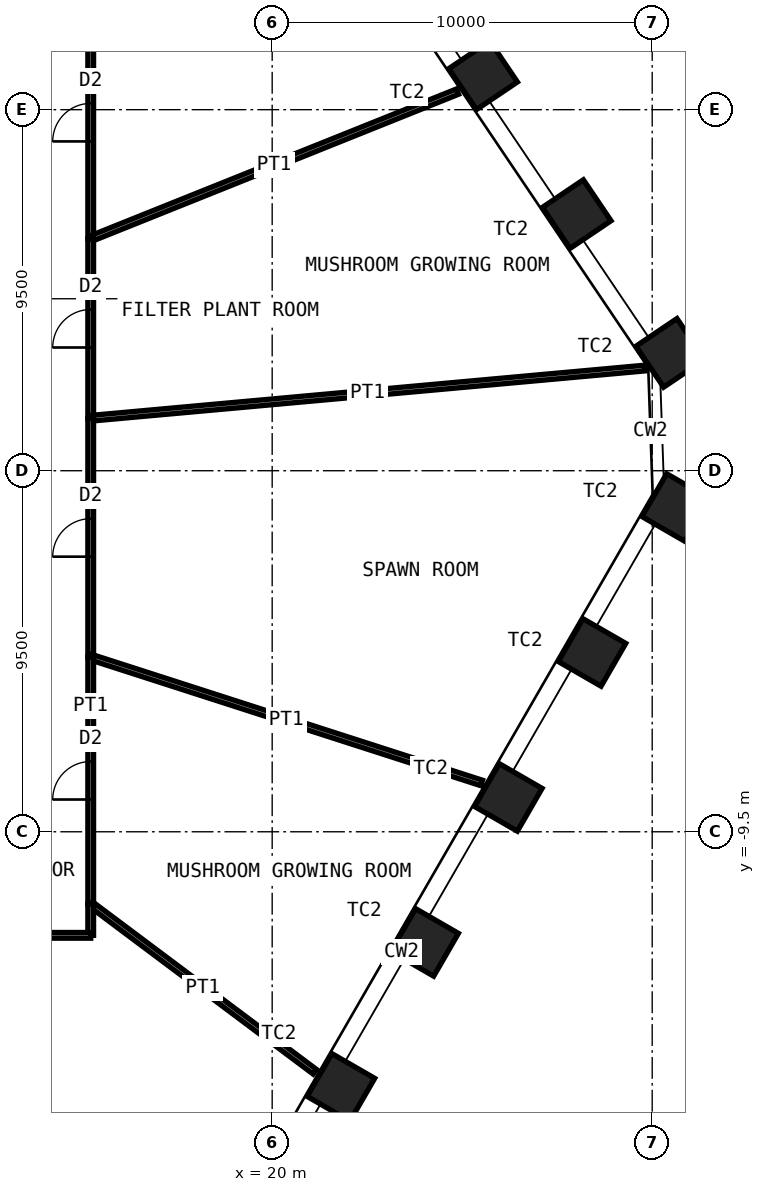
"""IFC4 building model, lengths in metres.
Left out: names, types, materials, properties, quantities, classifications, styles, units other than length and angle.
Written with IfcOpenShell. Run it as: python <this file> out.ifc"""

import sys

from ifc_helpers import new_model, si_unit, direction, frame, frame_2d, origin, origin_2d, place, context, subcontext, project, spatial, rectangle, hollow_rectangle, extrude, element, fill, save


model = new_model("IFC4")
c1 = context("Model", 3, precision=1e-05, world=origin(), true_north=direction((0.0, 1.0)))
c2 = subcontext(c1, "Body", "Model", "MODEL_VIEW")
j1 = project(units=[si_unit("LENGTHUNIT", "METRE"), si_unit("PLANEANGLEUNIT", "RADIAN")], contexts=[c1])
p1 = place(None, origin())
s1 = spatial("IfcSite", under=j1, at=p1, CompositionType="ELEMENT")
p2 = place(p1, origin())
s2 = spatial("IfcBuilding", under=s1, at=p2, CompositionType="ELEMENT")
p3 = place(p2, frame((0.0, 0.0, 67.0)))
s3 = spatial("IfcBuildingStorey", under=s2, at=p3, CompositionType="ELEMENT", Elevation=67.0)
for number, where, z_axis, x_axis in (
    (1, (25.55, 10.404, 0.0), (0.0, 0.0, 1.0), (-0.559, 0.829, 0.0)),
    (2, (28.013, 6.752, 0.0), (0.0, 0.0, 1.0), (-0.559, 0.829, 0.0)),
    (3, (30.476, 3.101, 0.0), (0.0, 0.0, 1.0), (-0.559, 0.829, 0.0)),
    (4, (30.618, -0.967, 0.0), (0.0, 0.0, 1.0), (0.5, 0.866, 0.0)),
    (5, (28.416, -4.782, 0.0), (0.0, 0.0, 1.0), (0.5, 0.866, 0.0)),
    (6, (26.214, -8.596, 0.0), (0.0, 0.0, 1.0), (0.5, 0.866, 0.0)),
    (7, (24.011, -12.411, 0.0), (0.0, 0.0, 1.0), (0.5, 0.866, 0.0)),
    (8, (21.809, -16.225, 0.0), (0.0, 0.0, 1.0), (0.5, 0.866, 0.0)),
):
    element("IfcColumn", number, at=place(p3, frame(where, z_axis=z_axis, x_axis=x_axis)), inside=s3, PredefinedType="COLUMN", context=c2, shape_type="SweptSolid", body=[
        extrude(hollow_rectangle(XDim=1.3, YDim=1.3, WallThickness=0.1, at=origin_2d()), origin(), (0.0, 0.0, 1.0), 5.0),
    ])
p4 = place(p3, frame((15.225, 12.225, 0.0), z_axis=(0.0, 0.0, 1.0), x_axis=(0.0, -1.0, 0.0)))
e9 = element("IfcWall", 9, at=p4, inside=s3, PredefinedType="PARTITIONING", context=c2, shape_type="SweptSolid", body=[
    extrude(rectangle(XDim=6.12, YDim=0.15, at=frame_2d((3.06, 0.0))), origin(), (0.0, 0.0, 1.0), 4.8),
])
p5 = place(p4, frame((2.56, 0.0, 0.0)))
e10 = element("IfcOpeningElement", 10, at=p5, cuts=e9, PredefinedType="OPENING", context=c2, shape_type="SweptSolid", body=[
    extrude(rectangle(XDim=1.0, YDim=2.4, at=frame_2d((0.5, 1.2))), frame((0.0, 0.085, 0.0), z_axis=(0.0, -1.0, 0.0), x_axis=(1.0, 0.0, 0.0)), (0.0, 0.0, 1.0), 0.17),
])
p6 = place(p3, frame((24.877, 9.975, 0.0), z_axis=(0.0, 0.0, 1.0), x_axis=(-0.928160631083, -0.372179852904, 0.0)))
e11 = element("IfcWall", 11, at=p6, inside=s3, PredefinedType="PARTITIONING", context=c2, shape_type="SweptSolid", body=[
    extrude(rectangle(XDim=10.399, YDim=0.15, at=frame_2d((5.2, 0.0))), origin(), (0.0, 0.0, 1.0), 3.7),
])
p7 = place(p3, frame((15.225, 6.105, 0.0), z_axis=(0.0, 0.0, 1.0), x_axis=(0.0, -1.0, 0.0)))
e12 = element("IfcWall", 12, at=p7, inside=s3, PredefinedType="PARTITIONING", context=c2, shape_type="SweptSolid", body=[
    extrude(rectangle(XDim=4.725, YDim=0.15, at=frame_2d((2.363, 0.0))), origin(), (0.0, 0.0, 1.0), 4.8),
])
p8 = place(p7, frame((1.863, 0.0, 0.0)))
e13 = element("IfcOpeningElement", 13, at=p8, cuts=e12, PredefinedType="OPENING", context=c2, shape_type="SweptSolid", body=[
    extrude(rectangle(XDim=1.0, YDim=2.4, at=frame_2d((0.5, 1.2))), frame((0.0, 0.085, 0.0), z_axis=(0.0, -1.0, 0.0), x_axis=(1.0, 0.0, 0.0)), (0.0, 0.0, 1.0), 0.17),
])
p9 = place(p3, frame((29.796, 2.7, 0.0), z_axis=(0.0, 0.0, 1.0), x_axis=(-0.995918470907, -0.090257405823, 0.0)))
e14 = element("IfcWall", 14, at=p9, inside=s3, PredefinedType="PARTITIONING", context=c2, shape_type="SweptSolid", body=[
    extrude(rectangle(XDim=14.631, YDim=0.15, at=frame_2d((7.315, 0.0))), origin(), (0.0, 0.0, 1.0), 3.7),
])
p10 = place(p3, frame((15.225, 1.38, 0.0), z_axis=(0.0, 0.0, 1.0), x_axis=(0.0, -1.0, 0.0)))
e15 = element("IfcWall", 15, at=p10, inside=s3, PredefinedType="PARTITIONING", context=c2, shape_type="SweptSolid", body=[
    extrude(rectangle(XDim=6.283, YDim=0.15, at=frame_2d((3.141, 0.0))), origin(), (0.0, 0.0, 1.0), 4.8),
])
p11 = place(p10, frame((2.641, 0.0, 0.0)))
e16 = element("IfcOpeningElement", 16, at=p11, cuts=e15, PredefinedType="OPENING", context=c2, shape_type="SweptSolid", body=[
    extrude(rectangle(XDim=1.0, YDim=2.4, at=frame_2d((0.5, 1.2))), frame((0.0, 0.085, 0.0), z_axis=(0.0, -1.0, 0.0), x_axis=(1.0, 0.0, 0.0)), (0.0, 0.0, 1.0), 0.17),
])
p12 = place(p3, frame((25.512, -8.216, 0.0), z_axis=(0.0, 0.0, 1.0), x_axis=(-0.95186413264, 0.306520265225, 0.0)))
e17 = element("IfcWall", 17, at=p12, inside=s3, PredefinedType="PARTITIONING", context=c2, shape_type="SweptSolid", body=[
    extrude(rectangle(XDim=10.808, YDim=0.15, at=frame_2d((5.404, 0.0))), origin(), (0.0, 0.0, 1.0), 3.7),
])
p13 = place(p3, frame((15.225, -4.903, 0.0), z_axis=(0.0, 0.0, 1.0), x_axis=(0.0, -1.0, 0.0)))
e18 = element("IfcWall", 18, at=p13, inside=s3, PredefinedType="PARTITIONING", context=c2, shape_type="SweptSolid", body=[
    extrude(rectangle(XDim=6.497, YDim=0.15, at=frame_2d((3.248, 0.0))), origin(), (0.0, 0.0, 1.0), 4.8),
])
p14 = place(p13, frame((2.748, 0.0, 0.0)))
e19 = element("IfcOpeningElement", 19, at=p14, cuts=e18, PredefinedType="OPENING", context=c2, shape_type="SweptSolid", body=[
    extrude(rectangle(XDim=1.0, YDim=2.4, at=frame_2d((0.5, 1.2))), frame((0.0, 0.085, 0.0), z_axis=(0.0, -1.0, 0.0), x_axis=(1.0, 0.0, 0.0)), (0.0, 0.0, 1.0), 0.17),
])
p15 = place(p3, frame((21.123, -15.815, 0.0), z_axis=(0.0, 0.0, 1.0), x_axis=(-0.800484840692, 0.599353001012, 0.0)))
e20 = element("IfcWall", 20, at=p15, inside=s3, PredefinedType="PARTITIONING", context=c2, shape_type="SweptSolid", body=[
    extrude(rectangle(XDim=7.368, YDim=0.15, at=frame_2d((3.684, 0.0))), origin(), (0.0, 0.0, 1.0), 3.7),
])
p16 = place(p3, frame((15.225, -11.399, 0.0), z_axis=(0.0, 0.0, 1.0), x_axis=(0.0, -1.0, 0.0)))
e21 = element("IfcWall", 21, at=p16, inside=s3, PredefinedType="PARTITIONING", context=c2, shape_type="SweptSolid", body=[
    extrude(rectangle(XDim=0.826, YDim=0.15, at=frame_2d((0.413, 0.0))), origin(), (0.0, 0.0, 1.0), 4.8),
])
p17 = place(p3, frame((15.225, -12.225, 0.0), z_axis=(0.0, 0.0, 1.0), x_axis=(-1.0, 0.0, 0.0)))
e22 = element("IfcWall", 22, at=p17, inside=s3, PredefinedType="PARTITIONING", context=c2, shape_type="SweptSolid", body=[
    extrude(rectangle(XDim=6.488, YDim=0.15, at=frame_2d((3.244, 0.0))), origin(), (0.0, 0.0, 1.0), 4.8),
])
p18 = place(p17, frame((2.744, 0.0, 0.0)))
e23 = element("IfcOpeningElement", 23, at=p18, cuts=e22, PredefinedType="OPENING", context=c2, shape_type="SweptSolid", body=[
    extrude(rectangle(XDim=1.0, YDim=2.4, at=frame_2d((0.5, 1.2))), frame((0.0, 0.085, 0.0), z_axis=(0.0, -1.0, 0.0), x_axis=(1.0, 0.0, 0.0)), (0.0, 0.0, 1.0), 0.17),
])
p19 = place(p3, frame((16.74, -23.423, 0.0), z_axis=(0.0, 0.0, 1.0), x_axis=(-0.581459653783, 0.813575239927, 0.0)))
e24 = element("IfcWall", 24, at=p19, inside=s3, PredefinedType="PARTITIONING", context=c2, shape_type="SweptSolid", body=[
    extrude(rectangle(XDim=13.764, YDim=0.15, at=frame_2d((6.882, 0.0))), origin(), (0.0, 0.0, 1.0), 3.7),
])
p20 = place(p5, origin())
e25 = element("IfcDoor", 25, at=p20, inside=s3, OperationType="SINGLE_SWING_RIGHT", PredefinedType="DOOR", context=c2, shape_type="SweptSolid", body=[
    extrude(rectangle(XDim=1.0, YDim=2.4, at=frame_2d((0.5, 1.2))), frame((0.0, 0.025, 0.0), z_axis=(0.0, -1.0, 0.0), x_axis=(1.0, 0.0, 0.0)), (0.0, 0.0, 1.0), 0.05),
])
fill(e10, e25)
p21 = place(p8, origin())
e26 = element("IfcDoor", 26, at=p21, inside=s3, OperationType="SINGLE_SWING_RIGHT", PredefinedType="DOOR", context=c2, shape_type="SweptSolid", body=[
    extrude(rectangle(XDim=1.0, YDim=2.4, at=frame_2d((0.5, 1.2))), frame((0.0, 0.025, 0.0), z_axis=(0.0, -1.0, 0.0), x_axis=(1.0, 0.0, 0.0)), (0.0, 0.0, 1.0), 0.05),
])
fill(e13, e26)
p22 = place(p11, origin())
e27 = element("IfcDoor", 27, at=p22, inside=s3, OperationType="SINGLE_SWING_RIGHT", PredefinedType="DOOR", context=c2, shape_type="SweptSolid", body=[
    extrude(rectangle(XDim=1.0, YDim=2.4, at=frame_2d((0.5, 1.2))), frame((0.0, 0.025, 0.0), z_axis=(0.0, -1.0, 0.0), x_axis=(1.0, 0.0, 0.0)), (0.0, 0.0, 1.0), 0.05),
])
fill(e16, e27)
p23 = place(p14, origin())
e28 = element("IfcDoor", 28, at=p23, inside=s3, OperationType="SINGLE_SWING_RIGHT", PredefinedType="DOOR", context=c2, shape_type="SweptSolid", body=[
    extrude(rectangle(XDim=1.0, YDim=2.4, at=frame_2d((0.5, 1.2))), frame((0.0, 0.025, 0.0), z_axis=(0.0, -1.0, 0.0), x_axis=(1.0, 0.0, 0.0)), (0.0, 0.0, 1.0), 0.05),
])
fill(e19, e28)
save(model, sys.argv[1])
